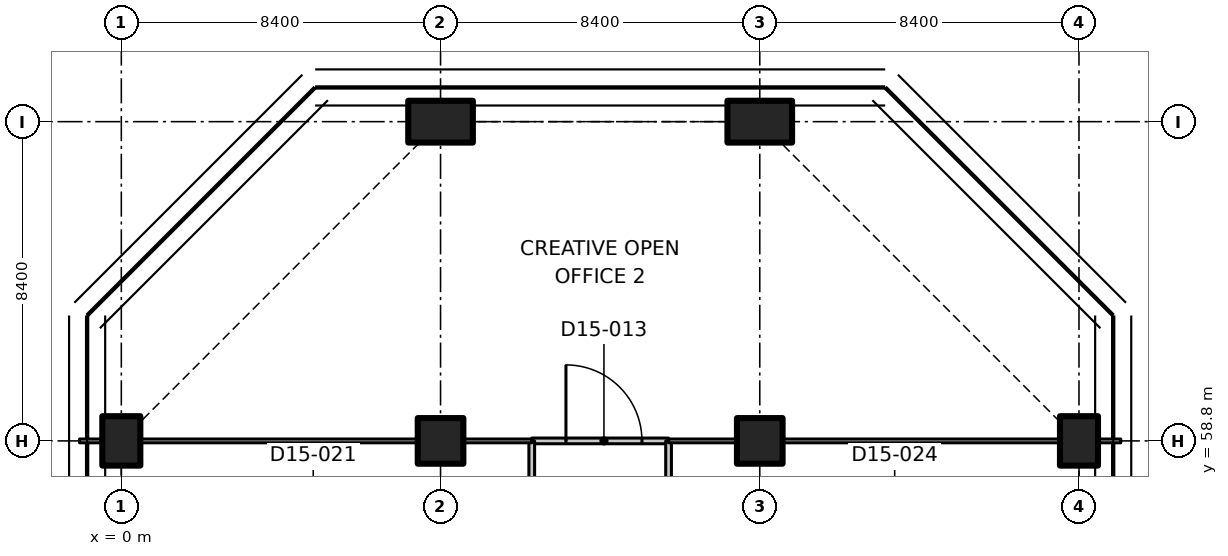
"""IFC4 building model, lengths in metres.
Left out: names, types, materials, properties, quantities, classifications, styles, units other than length and angle.
Written with IfcOpenShell. Run it as: python <this file> out.ifc"""

import sys

from ifc_helpers import new_model, si_unit, direction, frame, frame_2d, origin, origin_2d, place, context, subcontext, project, spatial, polyline, rectangle, outline, extrude, element, fill, save


model = new_model("IFC4")
c1 = context("Model", 3, precision=1e-05, world=origin(), true_north=direction((0.0, 1.0)))
c2 = subcontext(c1, "Body", "Model", "MODEL_VIEW")
j1 = project(units=[si_unit("LENGTHUNIT", "METRE"), si_unit("PLANEANGLEUNIT", "RADIAN")], contexts=[c1])
p1 = place(None, origin())
s1 = spatial("IfcSite", under=j1, at=p1, CompositionType="ELEMENT")
p2 = place(p1, origin())
s2 = spatial("IfcBuilding", under=s1, at=p2, CompositionType="ELEMENT")
p3 = place(p2, frame((0.0, 0.0, 116.9)))
s3 = spatial("IfcBuildingStorey", under=s2, at=p3, CompositionType="ELEMENT", Elevation=116.9)
p4 = place(p3, frame((0.0, 58.8, 0.0), z_axis=(0.0, 0.0, 1.0), x_axis=(1.0, 0.0, 0.0)))
e1 = element("IfcColumn", 1, at=p4, inside=s3, PredefinedType="COLUMN", context=c2, shape_type="SweptSolid", body=[
    extrude(rectangle(XDim=1.0, YDim=1.3, at=origin_2d()), origin(), (0.0, 0.0, 1.0), 3.35),
])
p5 = place(p3, frame((8.4, 58.8, 0.0), z_axis=(0.0, 0.0, 1.0), x_axis=(1.0, 0.0, 0.0)))
e2 = element("IfcColumn", 2, at=p5, inside=s3, PredefinedType="COLUMN", context=c2, shape_type="SweptSolid", body=[
    extrude(rectangle(XDim=1.2, YDim=1.2, at=origin_2d()), origin(), (0.0, 0.0, 1.0), 3.35),
])
p6 = place(p3, frame((8.4, 67.2, 0.0), z_axis=(0.0, 0.0, 1.0), x_axis=(0.0, 1.0, 0.0)))
e3 = element("IfcColumn", 3, at=p6, inside=s3, PredefinedType="COLUMN", context=c2, shape_type="SweptSolid", body=[
    extrude(rectangle(XDim=1.1, YDim=1.7, at=origin_2d()), origin(), (0.0, 0.0, 1.0), 3.35),
])
p7 = place(p3, frame((16.8, 58.8, 0.0), z_axis=(0.0, 0.0, 1.0), x_axis=(1.0, 0.0, 0.0)))
e4 = element("IfcColumn", 4, at=p7, inside=s3, PredefinedType="COLUMN", context=c2, shape_type="SweptSolid", body=[
    extrude(rectangle(XDim=1.2, YDim=1.2, at=origin_2d()), origin(), (0.0, 0.0, 1.0), 3.35),
])
p8 = place(p3, frame((16.8, 67.2, 0.0), z_axis=(0.0, 0.0, 1.0), x_axis=(0.0, 1.0, 0.0)))
e5 = element("IfcColumn", 5, at=p8, inside=s3, PredefinedType="COLUMN", context=c2, shape_type="SweptSolid", body=[
    extrude(rectangle(XDim=1.1, YDim=1.7, at=origin_2d()), origin(), (0.0, 0.0, 1.0), 3.35),
])
p9 = place(p3, frame((25.2, 58.8, 0.0), z_axis=(0.0, 0.0, 1.0), x_axis=(1.0, 0.0, 0.0)))
e6 = element("IfcColumn", 6, at=p9, inside=s3, PredefinedType="COLUMN", context=c2, shape_type="SweptSolid", body=[
    extrude(rectangle(XDim=1.0, YDim=1.3, at=origin_2d()), origin(), (0.0, 0.0, 1.0), 3.35),
])
p10 = place(p3, frame((10.8, 58.8, 0.0), z_axis=(0.0, 0.0, 1.0), x_axis=(1.0, 0.0, 0.0)))
e7 = element("IfcWall", 7, at=p10, inside=s3, PredefinedType="PARTITIONING", context=c2, shape_type="SweptSolid", body=[
    extrude(rectangle(XDim=3.6, YDim=0.15, at=frame_2d((1.8, 0.0))), origin(), (0.0, 0.0, 1.0), 3.33),
])
p11 = place(p10, frame((0.9, 0.0, 0.0)))
e8 = element("IfcOpeningElement", 8, at=p11, cuts=e7, PredefinedType="OPENING", context=c2, shape_type="SweptSolid", body=[
    extrude(rectangle(XDim=2.0, YDim=2.4, at=frame_2d((1.0, 1.2))), frame((0.0, 0.085, 0.0), z_axis=(0.0, -1.0, 0.0), x_axis=(1.0, 0.0, 0.0)), (0.0, 0.0, 1.0), 0.17),
])
for number, where, z_axis, x_axis in (
    (9, (10.8, 54.6, 0.0), (0.0, 0.0, 1.0), (0.0, 1.0, 0.0)),
    (10, (14.4, 58.8, 0.0), (0.0, 0.0, 1.0), (0.0, -1.0, 0.0)),
):
    element("IfcWall", number, at=place(p3, frame(where, z_axis=z_axis, x_axis=x_axis)), inside=s3, PredefinedType="PARTITIONING", context=c2, shape_type="SweptSolid", body=[
        extrude(rectangle(XDim=4.2, YDim=0.15, at=frame_2d((2.1, 0.0))), origin(), (0.0, 0.0, 1.0), 3.33),
    ])
p12 = place(p3, frame((10.8, 58.8, 0.0), z_axis=(0.0, 0.0, 1.0), x_axis=(-1.0, 0.0, 0.0)))
e11 = element("IfcWall", 11, at=p12, inside=s3, PredefinedType="PARTITIONING", context=c2, shape_type="SweptSolid", body=[
    extrude(rectangle(XDim=1.78, YDim=0.1, at=frame_2d((0.89, 0.0))), origin(), (0.0, 0.0, 1.0), 3.33),
])
p13 = place(p3, frame((7.78, 58.8, 0.0), z_axis=(0.0, 0.0, 1.0), x_axis=(-1.0, 0.0, 0.0)))
e12 = element("IfcWall", 12, at=p13, inside=s3, PredefinedType="PARTITIONING", context=c2, shape_type="SweptSolid", body=[
    extrude(outline(polyline([(0.0, 0.0), (7.26, 0.0), (7.26, 2.98), (7.116, 2.98), (7.114, 3.33), (0.0, 3.33), (0.0, 0.0)])), frame((0.0, 0.05, 0.0), z_axis=(0.0, -1.0, 0.0), x_axis=(1.0, 0.0, 0.0)), (0.0, 0.0, 1.0), 0.1),
])
for number, where, z_axis, x_axis in (
    (13, (-0.52, 58.8, 0.0), (0.0, 0.0, 1.0), (-1.0, 0.0, 0.0)),
    (14, (26.3, 58.8, 0.0), (0.0, 0.0, 1.0), (-1.0, 0.0, 0.0)),
):
    element("IfcWall", number, at=place(p3, frame(where, z_axis=z_axis, x_axis=x_axis)), inside=s3, PredefinedType="PARTITIONING", context=c2, shape_type="SweptSolid", body=[
        extrude(rectangle(XDim=0.58, YDim=0.1, at=frame_2d((0.29, 0.0))), origin(), (0.0, 0.0, 1.0), 3.33),
    ])
p14 = place(p3, frame((24.68, 58.8, 0.0), z_axis=(0.0, 0.0, 1.0), x_axis=(-1.0, 0.0, 0.0)))
e15 = element("IfcWall", 15, at=p14, inside=s3, PredefinedType="PARTITIONING", context=c2, shape_type="SweptSolid", body=[
    extrude(outline(polyline([(0.0, 0.0), (7.26, 0.0), (7.26, 3.33), (0.146, 3.33), (0.144, 2.98), (0.0, 2.98), (0.0, 0.0)])), frame((0.0, 0.05, 0.0), z_axis=(0.0, -1.0, 0.0), x_axis=(1.0, 0.0, 0.0)), (0.0, 0.0, 1.0), 0.1),
])
p15 = place(p3, frame((16.18, 58.8, 0.0), z_axis=(0.0, 0.0, 1.0), x_axis=(-1.0, 0.0, 0.0)))
e16 = element("IfcWall", 16, at=p15, inside=s3, PredefinedType="PARTITIONING", context=c2, shape_type="SweptSolid", body=[
    extrude(rectangle(XDim=1.78, YDim=0.1, at=frame_2d((0.89, 0.0))), origin(), (0.0, 0.0, 1.0), 3.33),
])
p16 = place(p11, origin())
e17 = element("IfcDoor", 17, at=p16, inside=s3, OperationType="DOUBLE_DOOR_SINGLE_SWING", PredefinedType="DOOR", context=c2, shape_type="SweptSolid", body=[
    extrude(rectangle(XDim=2.0, YDim=2.4, at=frame_2d((1.0, 1.2))), frame((0.0, 0.025, 0.0), z_axis=(0.0, -1.0, 0.0), x_axis=(1.0, 0.0, 0.0)), (0.0, 0.0, 1.0), 0.05),
])
fill(e8, e17)
save(model, sys.argv[1])
